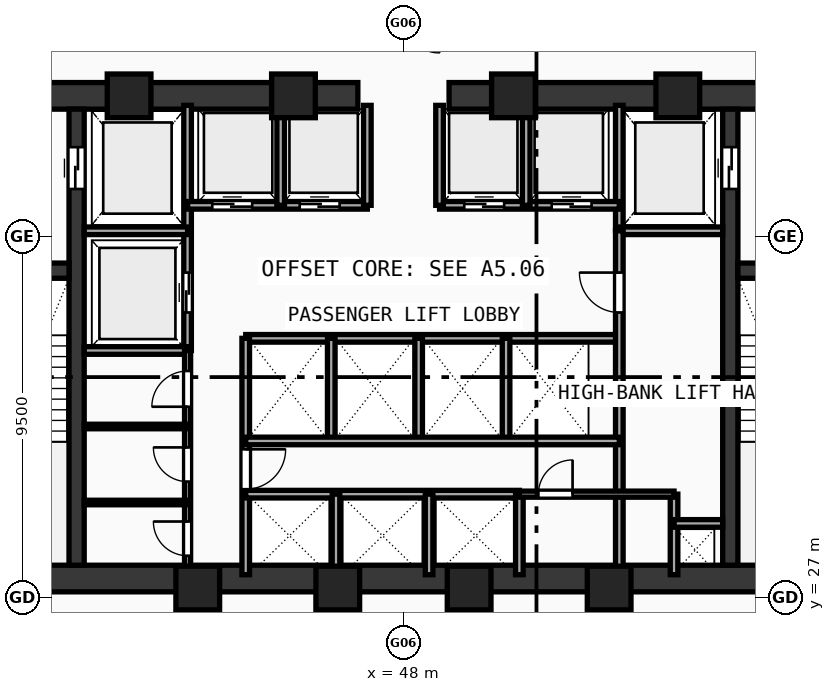
"""IFC4 building model, lengths in metres.
Left out: names, types, materials, properties, quantities, classifications, styles, units other than length and angle.
Written with IfcOpenShell. Run it as: python <this file> out.ifc"""

import sys

from ifc_helpers import new_model, si_unit, direction, frame, frame_2d, origin, origin_with_axes, origin_2d, place, context, subcontext, project, spatial, rectangle, hollow_rectangle, extrude, source, transform, mapped, element, fill, save


model = new_model("IFC4")
c1 = context("Model", 3, precision=1e-05, world=origin(), true_north=direction((0.0, 1.0)))
c2 = subcontext(c1, "Body", "Model", "MODEL_VIEW")
j1 = project(units=[si_unit("LENGTHUNIT", "METRE"), si_unit("PLANEANGLEUNIT", "RADIAN")], contexts=[c1])
p1 = place(None, origin())
s1 = spatial("IfcSite", under=j1, at=p1, CompositionType="ELEMENT")
p2 = place(p1, origin())
s2 = spatial("IfcBuilding", under=s1, at=p2, CompositionType="ELEMENT")
p3 = place(p2, frame((0.0, 0.0, 59.44)))
s3 = spatial("IfcBuildingStorey", under=s2, at=p3, CompositionType="ELEMENT", Elevation=59.44)
p4 = place(p3, frame((35.45, 27.5, 0.0), z_axis=(0.0, 0.0, 1.0), x_axis=(1.0, 0.0, 0.0)))
e1 = element("IfcWall", 1, at=p4, inside=s3, PredefinedType="SHEAR", context=c2, shape_type="SweptSolid", body=[
    extrude(rectangle(XDim=25.1, YDim=0.7, at=frame_2d((12.55, 0.0))), origin(), (0.0, 0.0, 1.0), 3.37),
])
p5 = place(p3, frame((35.45, 40.2, 0.0), z_axis=(0.0, 0.0, 1.0), x_axis=(1.0, 0.0, 0.0)))
e2 = element("IfcWall", 2, at=p5, inside=s3, PredefinedType="SHEAR", context=c2, shape_type="SweptSolid", body=[
    extrude(rectangle(XDim=11.35, YDim=0.7, at=frame_2d((5.675, 0.0))), origin(), (0.0, 0.0, 1.0), 3.37),
])
p6 = place(p5, frame((1.7, 0.0, 0.0)))
e3 = element("IfcOpeningElement", 3, at=p6, cuts=e2, PredefinedType="OPENING", context=c2, shape_type="SweptSolid", body=[
    extrude(rectangle(XDim=1.05, YDim=2.1, at=frame_2d((0.525, 1.05))), frame((0.0, 0.36, 0.0), z_axis=(0.0, -1.0, 0.0), x_axis=(1.0, 0.0, 0.0)), (0.0, 0.0, 1.0), 0.72),
])
p7 = place(p3, frame((49.2, 40.2, 0.0), z_axis=(0.0, 0.0, 1.0), x_axis=(1.0, 0.0, 0.0)))
e4 = element("IfcWall", 4, at=p7, inside=s3, PredefinedType="SHEAR", context=c2, shape_type="SweptSolid", body=[
    extrude(rectangle(XDim=11.35, YDim=0.7, at=frame_2d((5.675, 0.0))), origin(), (0.0, 0.0, 1.0), 3.37),
])
p8 = place(p7, frame((8.6, 0.0, 0.0)))
e5 = element("IfcOpeningElement", 5, at=p8, cuts=e4, PredefinedType="OPENING", context=c2, shape_type="SweptSolid", body=[
    extrude(rectangle(XDim=1.05, YDim=2.1, at=frame_2d((0.525, 1.05))), frame((0.0, 0.36, 0.0), z_axis=(0.0, -1.0, 0.0), x_axis=(1.0, 0.0, 0.0)), (0.0, 0.0, 1.0), 0.72),
])
p9 = place(p3, frame((39.4, 27.85, 0.0), z_axis=(0.0, 0.0, 1.0), x_axis=(0.0, 1.0, 0.0)))
e6 = element("IfcWall", 6, at=p9, inside=s3, PredefinedType="SHEAR", context=c2, shape_type="SweptSolid", body=[
    extrude(rectangle(XDim=12.0, YDim=0.4, at=frame_2d((6.0, 0.0))), origin(), (0.0, 0.0, 1.0), 3.37),
])
p10 = place(p9, frame((9.9, 0.0, 0.0)))
e7 = element("IfcOpeningElement", 7, at=p10, cuts=e6, PredefinedType="OPENING", context=c2, shape_type="SweptSolid", body=[
    extrude(rectangle(XDim=1.1, YDim=2.1, at=frame_2d((0.55, 1.05))), frame((0.0, 0.21, 0.0), z_axis=(0.0, -1.0, 0.0), x_axis=(1.0, 0.0, 0.0)), (0.0, 0.0, 1.0), 0.42),
])
p11 = place(p3, frame((56.6, 27.85, 0.0), z_axis=(0.0, 0.0, 1.0), x_axis=(0.0, 1.0, 0.0)))
e8 = element("IfcWall", 8, at=p11, inside=s3, PredefinedType="SHEAR", context=c2, shape_type="SweptSolid", body=[
    extrude(rectangle(XDim=12.0, YDim=0.4, at=frame_2d((6.0, 0.0))), origin(), (0.0, 0.0, 1.0), 3.37),
])
p12 = place(p11, frame((9.9, 0.0, 0.0)))
e9 = element("IfcOpeningElement", 9, at=p12, cuts=e8, PredefinedType="OPENING", context=c2, shape_type="SweptSolid", body=[
    extrude(rectangle(XDim=1.1, YDim=2.1, at=frame_2d((0.55, 1.05))), frame((0.0, 0.21, 0.0), z_axis=(0.0, -1.0, 0.0), x_axis=(1.0, 0.0, 0.0)), (0.0, 0.0, 1.0), 0.42),
])
p13 = place(p3, frame((36.15, 35.6, 0.0), z_axis=(0.0, 0.0, 1.0), x_axis=(1.0, 0.0, 0.0)))
e10 = element("IfcWall", 10, at=p13, inside=s3, PredefinedType="SHEAR", context=c2, shape_type="SweptSolid", body=[
    extrude(rectangle(XDim=3.05, YDim=0.4, at=frame_2d((1.525, 0.0))), origin(), (0.0, 0.0, 1.0), 3.37),
])
p14 = place(p13, frame((0.97, 0.0, 0.0)))
e11 = element("IfcOpeningElement", 11, at=p14, cuts=e10, PredefinedType="OPENING", context=c2, shape_type="SweptSolid", body=[
    extrude(rectangle(XDim=1.05, YDim=2.1, at=frame_2d((0.525, 1.05))), frame((0.0, 0.21, 0.0), z_axis=(0.0, -1.0, 0.0), x_axis=(1.0, 0.0, 0.0)), (0.0, 0.0, 1.0), 0.42),
])
p15 = place(p3, frame((56.8, 35.6, 0.0), z_axis=(0.0, 0.0, 1.0), x_axis=(1.0, 0.0, 0.0)))
e12 = element("IfcWall", 12, at=p15, inside=s3, PredefinedType="SHEAR", context=c2, shape_type="SweptSolid", body=[
    extrude(rectangle(XDim=3.05, YDim=0.4, at=frame_2d((1.525, 0.0))), origin(), (0.0, 0.0, 1.0), 3.37),
])
p16 = place(p15, frame((1.02, 0.0, 0.0)))
e13 = element("IfcOpeningElement", 13, at=p16, cuts=e12, PredefinedType="OPENING", context=c2, shape_type="SweptSolid", body=[
    extrude(rectangle(XDim=1.05, YDim=2.1, at=frame_2d((0.525, 1.05))), frame((0.0, 0.21, 0.0), z_axis=(0.0, -1.0, 0.0), x_axis=(1.0, 0.0, 0.0)), (0.0, 0.0, 1.0), 0.42),
])
m1 = source(origin(), c2, "Body", "SweptSolid", [
    extrude(hollow_rectangle(XDim=1.15, YDim=1.15, WallThickness=0.048, at=origin_2d()), origin(), (0.0, 0.0, 1.0), 3.63),
])
for number, where, z_axis, x_axis in (
    (14, (42.588, 27.25, -0.26), (0.0, 0.0, 1.0), (1.0, 0.0, 0.0)),
    (15, (46.272, 27.25, -0.26), (0.0, 0.0, 1.0), (1.0, 0.0, 0.0)),
    (16, (49.729, 27.25, -0.26), (0.0, 0.0, 1.0), (1.0, 0.0, 0.0)),
    (17, (53.412, 27.25, -0.26), (0.0, 0.0, 1.0), (1.0, 0.0, 0.0)),
    (18, (55.219, 40.2, -0.26), (0.0, 0.0, 1.0), (1.0, 0.0, 0.0)),
    (19, (50.894, 40.2, -0.26), (0.0, 0.0, 1.0), (1.0, 0.0, 0.0)),
    (20, (45.106, 40.2, -0.26), (0.0, 0.0, 1.0), (1.0, 0.0, 0.0)),
    (21, (40.781, 40.2, -0.26), (0.0, 0.0, 1.0), (1.0, 0.0, 0.0)),
):
    element("IfcColumn", number, at=place(p3, frame(where, z_axis=z_axis, x_axis=x_axis)), inside=s3, PredefinedType="COLUMN", context=c2, shape_type="MappedRepresentation", body=[
        mapped(m1, transform((0.0, 0.0, 0.0), scale=1.0)),
    ])
p17 = place(p3, frame((42.32, 33.5, 0.0), z_axis=(0.0, 0.0, 1.0), x_axis=(0.0, 1.0, 0.0)))
e22 = element("IfcWall", 22, at=p17, inside=s3, PredefinedType="SOLIDWALL", context=c2, shape_type="SweptSolid", body=[
    extrude(rectangle(XDim=6.45, YDim=0.2, at=frame_2d((3.225, 0.0))), origin(), (0.0, 0.0, 1.0), 3.37),
])
p18 = place(p17, frame((1.0, 0.0, 0.0)))
e23 = element("IfcOpeningElement", 23, at=p18, cuts=e22, PredefinedType="OPENING", context=c2, shape_type="SweptSolid", body=[
    extrude(rectangle(XDim=1.05, YDim=2.1, at=frame_2d((0.525, 1.05))), frame((0.0, 0.11, 0.0), z_axis=(0.0, -1.0, 0.0), x_axis=(1.0, 0.0, 0.0)), (0.0, 0.0, 1.0), 0.22),
])
for number, where, z_axis, x_axis in (
    (24, (39.6, 36.65, 0.0), (0.0, 0.0, 1.0), (1.0, 0.0, 0.0)),
    (25, (39.6, 33.5, 0.0), (0.0, 0.0, 1.0), (1.0, 0.0, 0.0)),
):
    element("IfcWall", number, at=place(p3, frame(where, z_axis=z_axis, x_axis=x_axis)), inside=s3, PredefinedType="SOLIDWALL", context=c2, shape_type="SweptSolid", body=[
        extrude(rectangle(XDim=2.72, YDim=0.2, at=frame_2d((1.36, 0.0))), origin(), (0.0, 0.0, 1.0), 3.37),
    ])
p19 = place(p3, frame((53.68, 36.65, 0.0), z_axis=(0.0, 0.0, 1.0), x_axis=(0.0, 1.0, 0.0)))
e26 = element("IfcWall", 26, at=p19, inside=s3, PredefinedType="SOLIDWALL", context=c2, shape_type="SweptSolid", body=[
    extrude(rectangle(XDim=3.3, YDim=0.2, at=frame_2d((1.65, 0.0))), origin(), (0.0, 0.0, 1.0), 3.37),
])
p20 = place(p3, frame((53.68, 36.65, 0.0), z_axis=(0.0, 0.0, 1.0), x_axis=(1.0, 0.0, 0.0)))
e27 = element("IfcWall", 27, at=p20, inside=s3, PredefinedType="SOLIDWALL", context=c2, shape_type="SweptSolid", body=[
    extrude(rectangle(XDim=2.72, YDim=0.2, at=frame_2d((1.36, 0.0))), origin(), (0.0, 0.0, 1.0), 3.37),
])
p21 = place(p3, frame((42.32, 37.32, 0.0), z_axis=(0.0, 0.0, 1.0), x_axis=(1.0, 0.0, 0.0)))
e28 = element("IfcWall", 28, at=p21, inside=s3, PredefinedType="SOLIDWALL", context=c2, shape_type="SweptSolid", body=[
    extrude(rectangle(XDim=4.73, YDim=0.2, at=frame_2d((2.365, 0.0))), origin(), (0.0, 0.0, 1.0), 3.37),
])
p22 = place(p21, frame((0.65, 0.0, 0.0)))
e29 = element("IfcOpeningElement", 29, at=p22, cuts=e28, PredefinedType="OPENING", context=c2, shape_type="SweptSolid", body=[
    extrude(rectangle(XDim=1.05, YDim=2.1, at=frame_2d((0.525, 1.05))), frame((0.0, 0.11, 0.0), z_axis=(0.0, -1.0, 0.0), x_axis=(1.0, 0.0, 0.0)), (0.0, 0.0, 1.0), 0.22),
])
p23 = place(p21, frame((2.95, 0.0, 0.0)))
e30 = element("IfcOpeningElement", 30, at=p23, cuts=e28, PredefinedType="OPENING", context=c2, shape_type="SweptSolid", body=[
    extrude(rectangle(XDim=1.05, YDim=2.1, at=frame_2d((0.525, 1.05))), frame((0.0, 0.11, 0.0), z_axis=(0.0, -1.0, 0.0), x_axis=(1.0, 0.0, 0.0)), (0.0, 0.0, 1.0), 0.22),
])
p24 = place(p3, frame((48.95, 37.32, 0.0), z_axis=(0.0, 0.0, 1.0), x_axis=(1.0, 0.0, 0.0)))
e31 = element("IfcWall", 31, at=p24, inside=s3, PredefinedType="SOLIDWALL", context=c2, shape_type="SweptSolid", body=[
    extrude(rectangle(XDim=4.73, YDim=0.2, at=frame_2d((2.365, 0.0))), origin(), (0.0, 0.0, 1.0), 3.37),
])
p25 = place(p24, frame((0.65, 0.0, 0.0)))
e32 = element("IfcOpeningElement", 32, at=p25, cuts=e31, PredefinedType="OPENING", context=c2, shape_type="SweptSolid", body=[
    extrude(rectangle(XDim=1.05, YDim=2.1, at=frame_2d((0.525, 1.05))), frame((0.0, 0.11, 0.0), z_axis=(0.0, -1.0, 0.0), x_axis=(1.0, 0.0, 0.0)), (0.0, 0.0, 1.0), 0.22),
])
p26 = place(p24, frame((2.95, 0.0, 0.0)))
e33 = element("IfcOpeningElement", 33, at=p26, cuts=e31, PredefinedType="OPENING", context=c2, shape_type="SweptSolid", body=[
    extrude(rectangle(XDim=1.05, YDim=2.1, at=frame_2d((0.525, 1.05))), frame((0.0, 0.11, 0.0), z_axis=(0.0, -1.0, 0.0), x_axis=(1.0, 0.0, 0.0)), (0.0, 0.0, 1.0), 0.22),
])
for number, where, z_axis, x_axis in (
    (34, (47.05, 37.32, 0.0), (0.0, 0.0, 1.0), (0.0, 1.0, 0.0)),
    (35, (48.95, 37.32, 0.0), (0.0, 0.0, 1.0), (0.0, 1.0, 0.0)),
    (36, (44.77, 37.32, 0.0), (0.0, 0.0, 1.0), (0.0, 1.0, 0.0)),
    (37, (51.23, 37.32, 0.0), (0.0, 0.0, 1.0), (0.0, 1.0, 0.0)),
):
    element("IfcWall", number, at=place(p3, frame(where, z_axis=z_axis, x_axis=x_axis)), inside=s3, PredefinedType="SOLIDWALL", context=c2, shape_type="SweptSolid", body=[
        extrude(rectangle(XDim=2.63, YDim=0.2, at=frame_2d((1.315, 0.0))), origin(), (0.0, 0.0, 1.0), 3.37),
    ])
p27 = place(p3, frame((43.85, 33.82, 0.0), z_axis=(0.0, 0.0, 1.0), x_axis=(1.0, 0.0, 0.0)))
e38 = element("IfcWall", 38, at=p27, inside=s3, PredefinedType="SOLIDWALL", context=c2, shape_type="SweptSolid", body=[
    extrude(rectangle(XDim=9.83, YDim=0.2, at=frame_2d((4.915, 0.0))), origin(), (0.0, 0.0, 1.0), 3.37),
])
p28 = place(p3, frame((43.85, 27.6, 0.0), z_axis=(0.0, 0.0, 1.0), x_axis=(0.0, 1.0, 0.0)))
e39 = element("IfcWall", 39, at=p28, inside=s3, PredefinedType="SOLIDWALL", context=c2, shape_type="SweptSolid", body=[
    extrude(rectangle(XDim=6.22, YDim=0.2, at=frame_2d((3.11, 0.0))), origin(), (0.0, 0.0, 1.0), 3.37),
])
p29 = place(p28, frame((2.25, 0.0, 0.0)))
e40 = element("IfcOpeningElement", 40, at=p29, cuts=e39, PredefinedType="OPENING", context=c2, shape_type="SweptSolid", body=[
    extrude(rectangle(XDim=1.05, YDim=2.1, at=frame_2d((0.525, 1.05))), frame((0.0, 0.11, 0.0), z_axis=(0.0, -1.0, 0.0), x_axis=(1.0, 0.0, 0.0)), (0.0, 0.0, 1.0), 0.22),
])
p30 = place(p3, frame((53.68, 27.6, 0.0), z_axis=(0.0, 0.0, 1.0), x_axis=(0.0, 1.0, 0.0)))
e41 = element("IfcWall", 41, at=p30, inside=s3, PredefinedType="SOLIDWALL", context=c2, shape_type="SweptSolid", body=[
    extrude(rectangle(XDim=9.05, YDim=0.2, at=frame_2d((4.525, 0.0))), origin(), (0.0, 0.0, 1.0), 3.37),
])
p31 = place(p30, frame((6.9, 0.0, 0.0)))
e42 = element("IfcOpeningElement", 42, at=p31, cuts=e41, PredefinedType="OPENING", context=c2, shape_type="SweptSolid", body=[
    extrude(rectangle(XDim=1.05, YDim=2.1, at=frame_2d((0.525, 1.05))), frame((0.0, 0.11, 0.0), z_axis=(0.0, -1.0, 0.0), x_axis=(1.0, 0.0, 0.0)), (0.0, 0.0, 1.0), 0.22),
])
for number, where, z_axis, x_axis in (
    (43, (46.1, 31.12, 0.0), (0.0, 0.0, 1.0), (0.0, 1.0, 0.0)),
    (44, (48.4, 31.12, 0.0), (0.0, 0.0, 1.0), (0.0, 1.0, 0.0)),
    (45, (50.7, 31.12, 0.0), (0.0, 0.0, 1.0), (0.0, 1.0, 0.0)),
):
    element("IfcWall", number, at=place(p3, frame(where, z_axis=z_axis, x_axis=x_axis)), inside=s3, PredefinedType="SOLIDWALL", context=c2, shape_type="SweptSolid", body=[
        extrude(rectangle(XDim=2.7, YDim=0.2, at=frame_2d((1.35, 0.0))), origin(), (0.0, 0.0, 1.0), 3.37),
    ])
p32 = place(p3, frame((43.85, 29.72, 0.0), z_axis=(0.0, 0.0, 1.0), x_axis=(1.0, 0.0, 0.0)))
e46 = element("IfcWall", 46, at=p32, inside=s3, PredefinedType="SOLIDWALL", context=c2, shape_type="SweptSolid", body=[
    extrude(rectangle(XDim=7.2, YDim=0.2, at=frame_2d((3.6, 0.0))), origin(), (0.0, 0.0, 1.0), 3.37),
])
p33 = place(p3, frame((51.05, 27.6, 0.0), z_axis=(0.0, 0.0, 1.0), x_axis=(0.0, 1.0, 0.0)))
e47 = element("IfcWall", 47, at=p33, inside=s3, PredefinedType="SOLIDWALL", context=c2, shape_type="SweptSolid", body=[
    extrude(rectangle(XDim=2.12, YDim=0.2, at=frame_2d((1.06, 0.0))), origin(), (0.0, 0.0, 1.0), 3.37),
])
p34 = place(p3, frame((43.85, 31.12, 0.0), z_axis=(0.0, 0.0, 1.0), x_axis=(1.0, 0.0, 0.0)))
e48 = element("IfcWall", 48, at=p34, inside=s3, PredefinedType="SOLIDWALL", context=c2, shape_type="SweptSolid", body=[
    extrude(rectangle(XDim=9.83, YDim=0.2, at=frame_2d((4.915, 0.0))), origin(), (0.0, 0.0, 1.0), 3.37),
])
for number, where, z_axis, x_axis in (
    (49, (46.225, 27.6, 0.0), (0.0, 0.0, 1.0), (0.0, 1.0, 0.0)),
    (50, (48.675, 27.6, 0.0), (0.0, 0.0, 1.0), (0.0, 1.0, 0.0)),
    (51, (55.12, 27.6, 0.0), (0.0, 0.0, 1.0), (0.0, 1.0, 0.0)),
):
    element("IfcWall", number, at=place(p3, frame(where, z_axis=z_axis, x_axis=x_axis)), inside=s3, PredefinedType="SOLIDWALL", context=c2, shape_type="SweptSolid", body=[
        extrude(rectangle(XDim=2.12, YDim=0.2, at=frame_2d((1.06, 0.0))), origin(), (0.0, 0.0, 1.0), 3.37),
    ])
p35 = place(p3, frame((55.12, 28.95, 0.0), z_axis=(0.0, 0.0, 1.0), x_axis=(1.0, 0.0, 0.0)))
e52 = element("IfcWall", 52, at=p35, inside=s3, PredefinedType="SOLIDWALL", context=c2, shape_type="SweptSolid", body=[
    extrude(rectangle(XDim=1.28, YDim=0.2, at=frame_2d((0.64, 0.0))), origin(), (0.0, 0.0, 1.0), 3.37),
])
p36 = place(p3, frame((42.32, 27.6, 0.0), z_axis=(0.0, 0.0, 1.0), x_axis=(0.0, 1.0, 0.0)))
e53 = element("IfcWall", 53, at=p36, inside=s3, PredefinedType="PARTITIONING", context=c2, shape_type="SweptSolid", body=[
    extrude(rectangle(XDim=5.9, YDim=0.16, at=frame_2d((2.95, 0.0))), origin(), (0.0, 0.0, 1.0), 3.37),
])
p37 = place(p36, frame((0.5, 0.0, 0.0)))
e54 = element("IfcOpeningElement", 54, at=p37, cuts=e53, PredefinedType="OPENING", context=c2, shape_type="SweptSolid", body=[
    extrude(rectangle(XDim=0.9, YDim=2.1, at=frame_2d((0.45, 1.05))), frame((0.0, 0.09, 0.0), z_axis=(0.0, -1.0, 0.0), x_axis=(1.0, 0.0, 0.0)), (0.0, 0.0, 1.0), 0.18),
])
p38 = place(p36, frame((2.45, 0.0, 0.0)))
e55 = element("IfcOpeningElement", 55, at=p38, cuts=e53, PredefinedType="OPENING", context=c2, shape_type="SweptSolid", body=[
    extrude(rectangle(XDim=0.9, YDim=2.1, at=frame_2d((0.45, 1.05))), frame((0.0, 0.09, 0.0), z_axis=(0.0, -1.0, 0.0), x_axis=(1.0, 0.0, 0.0)), (0.0, 0.0, 1.0), 0.18),
])
p39 = place(p36, frame((4.42, 0.0, 0.0)))
e56 = element("IfcOpeningElement", 56, at=p39, cuts=e53, PredefinedType="OPENING", context=c2, shape_type="SweptSolid", body=[
    extrude(rectangle(XDim=0.94, YDim=2.1, at=frame_2d((0.47, 1.05))), frame((0.0, 0.09, 0.0), z_axis=(0.0, -1.0, 0.0), x_axis=(1.0, 0.0, 0.0)), (0.0, 0.0, 1.0), 0.18),
])
p40 = place(p3, frame((51.05, 29.72, 0.0), z_axis=(0.0, 0.0, 1.0), x_axis=(1.0, 0.0, 0.0)))
e57 = element("IfcWall", 57, at=p40, inside=s3, PredefinedType="PARTITIONING", context=c2, shape_type="SweptSolid", body=[
    extrude(rectangle(XDim=4.07, YDim=0.16, at=frame_2d((2.035, 0.0))), origin(), (0.0, 0.0, 1.0), 3.37),
])
p41 = place(p40, frame((0.5, 0.0, 0.0)))
e58 = element("IfcOpeningElement", 58, at=p41, cuts=e57, PredefinedType="OPENING", context=c2, shape_type="SweptSolid", body=[
    extrude(rectangle(XDim=0.9, YDim=2.1, at=frame_2d((0.45, 1.05))), frame((0.0, 0.09, 0.0), z_axis=(0.0, -1.0, 0.0), x_axis=(1.0, 0.0, 0.0)), (0.0, 0.0, 1.0), 0.18),
])
for number, where, z_axis, x_axis in (
    (59, (39.6, 29.5, 0.0), (0.0, 0.0, 1.0), (1.0, 0.0, 0.0)),
    (60, (39.6, 31.5, 0.0), (0.0, 0.0, 1.0), (1.0, 0.0, 0.0)),
):
    element("IfcWall", number, at=place(p3, frame(where, z_axis=z_axis, x_axis=x_axis)), inside=s3, PredefinedType="PARTITIONING", context=c2, shape_type="SweptSolid", body=[
        extrude(rectangle(XDim=2.72, YDim=0.12, at=frame_2d((1.36, 0.0))), origin(), (0.0, 0.0, 1.0), 3.37),
    ])
m2 = source(origin(), c2, "Body", "SweptSolid", [
    extrude(rectangle(XDim=1.1, YDim=2.1, at=frame_2d((0.55, 1.05))), frame((0.0, 0.025, 0.0), z_axis=(0.0, -1.0, 0.0), x_axis=(1.0, 0.0, 0.0)), (0.0, 0.0, 1.0), 0.05),
])
p42 = place(p10, frame((1.1, 0.0, 0.0), z_axis=(0.0, 0.0, 1.0), x_axis=(-1.0, 0.0, 0.0)))
e61 = element("IfcDoor", 61, at=p42, inside=s3, OperationType="DOUBLE_DOOR_SLIDING", PredefinedType="DOOR", context=c2, shape_type="MappedRepresentation", body=[
    mapped(m2, transform((0.0, 0.0, 0.0), scale=1.0)),
])
fill(e7, e61)
p43 = place(p12, origin_with_axes())
e62 = element("IfcDoor", 62, at=p43, inside=s3, OperationType="DOUBLE_DOOR_SLIDING", PredefinedType="DOOR", context=c2, shape_type="MappedRepresentation", body=[
    mapped(m2, transform((0.0, 0.0, 0.0), scale=1.0)),
])
fill(e9, e62)
m3 = source(origin(), c2, "Body", "SweptSolid", [
    extrude(rectangle(XDim=1.05, YDim=2.1, at=frame_2d((0.525, 1.05))), frame((0.0, 0.025, 0.0), z_axis=(0.0, -1.0, 0.0), x_axis=(1.0, 0.0, 0.0)), (0.0, 0.0, 1.0), 0.05),
])
p44 = place(p18, origin_with_axes())
e63 = element("IfcDoor", 63, at=p44, inside=s3, OperationType="DOUBLE_DOOR_SLIDING", PredefinedType="DOOR", context=c2, shape_type="MappedRepresentation", body=[
    mapped(m3, transform((0.0, 0.0, 0.0), scale=1.0)),
])
fill(e23, e63)
p45 = place(p22, frame((1.05, 0.0, 0.0), z_axis=(0.0, 0.0, 1.0), x_axis=(-1.0, 0.0, 0.0)))
e64 = element("IfcDoor", 64, at=p45, inside=s3, OperationType="DOUBLE_DOOR_SLIDING", PredefinedType="DOOR", context=c2, shape_type="MappedRepresentation", body=[
    mapped(m3, transform((0.0, 0.0, 0.0), scale=1.0)),
])
fill(e29, e64)
p46 = place(p23, frame((1.05, 0.0, 0.0), z_axis=(0.0, 0.0, 1.0), x_axis=(-1.0, 0.0, 0.0)))
e65 = element("IfcDoor", 65, at=p46, inside=s3, OperationType="DOUBLE_DOOR_SLIDING", PredefinedType="DOOR", context=c2, shape_type="MappedRepresentation", body=[
    mapped(m3, transform((0.0, 0.0, 0.0), scale=1.0)),
])
fill(e30, e65)
p47 = place(p25, frame((1.05, 0.0, 0.0), z_axis=(0.0, 0.0, 1.0), x_axis=(-1.0, 0.0, 0.0)))
e66 = element("IfcDoor", 66, at=p47, inside=s3, OperationType="DOUBLE_DOOR_SLIDING", PredefinedType="DOOR", context=c2, shape_type="MappedRepresentation", body=[
    mapped(m3, transform((0.0, 0.0, 0.0), scale=1.0)),
])
fill(e32, e66)
p48 = place(p26, frame((1.05, 0.0, 0.0), z_axis=(0.0, 0.0, 1.0), x_axis=(-1.0, 0.0, 0.0)))
e67 = element("IfcDoor", 67, at=p48, inside=s3, OperationType="DOUBLE_DOOR_SLIDING", PredefinedType="DOOR", context=c2, shape_type="MappedRepresentation", body=[
    mapped(m3, transform((0.0, 0.0, 0.0), scale=1.0)),
])
fill(e33, e67)
p49 = place(p29, frame((1.05, 0.0, 0.0), z_axis=(0.0, 0.0, 1.0), x_axis=(-1.0, 0.0, 0.0)))
e68 = element("IfcDoor", 68, at=p49, inside=s3, OperationType="SINGLE_SWING_LEFT", PredefinedType="DOOR", context=c2, shape_type="MappedRepresentation", body=[
    mapped(m3, transform((0.0, 0.0, 0.0), scale=1.0)),
])
fill(e40, e68)
p50 = place(p31, origin_with_axes())
e69 = element("IfcDoor", 69, at=p50, inside=s3, OperationType="SINGLE_SWING_RIGHT", PredefinedType="DOOR", context=c2, shape_type="MappedRepresentation", body=[
    mapped(m3, transform((0.0, 0.0, 0.0), scale=1.0)),
])
fill(e42, e69)
m4 = source(origin(), c2, "Body", "SweptSolid", [
    extrude(rectangle(XDim=0.9, YDim=2.1, at=frame_2d((0.45, 1.05))), frame((0.0, 0.025, 0.0), z_axis=(0.0, -1.0, 0.0), x_axis=(1.0, 0.0, 0.0)), (0.0, 0.0, 1.0), 0.05),
])
p51 = place(p37, origin_with_axes())
e70 = element("IfcDoor", 70, at=p51, inside=s3, OperationType="SINGLE_SWING_RIGHT", PredefinedType="DOOR", context=c2, shape_type="MappedRepresentation", body=[
    mapped(m4, transform((0.0, 0.0, 0.0), scale=1.0)),
])
fill(e54, e70)
p52 = place(p38, origin_with_axes())
e71 = element("IfcDoor", 71, at=p52, inside=s3, OperationType="SINGLE_SWING_RIGHT", PredefinedType="DOOR", context=c2, shape_type="MappedRepresentation", body=[
    mapped(m4, transform((0.0, 0.0, 0.0), scale=1.0)),
])
fill(e55, e71)
m5 = source(origin(), c2, "Body", "SweptSolid", [
    extrude(rectangle(XDim=0.94, YDim=2.1, at=frame_2d((0.47, 1.05))), frame((0.0, 0.025, 0.0), z_axis=(0.0, -1.0, 0.0), x_axis=(1.0, 0.0, 0.0)), (0.0, 0.0, 1.0), 0.05),
])
p53 = place(p39, origin_with_axes())
e72 = element("IfcDoor", 72, at=p53, inside=s3, OperationType="SINGLE_SWING_LEFT", PredefinedType="DOOR", context=c2, shape_type="MappedRepresentation", body=[
    mapped(m5, transform((0.0, 0.0, 0.0), scale=1.0)),
])
fill(e56, e72)
p54 = place(p41, origin_with_axes())
e73 = element("IfcDoor", 73, at=p54, inside=s3, OperationType="SINGLE_SWING_RIGHT", PredefinedType="DOOR", context=c2, shape_type="MappedRepresentation", body=[
    mapped(m4, transform((0.0, 0.0, 0.0), scale=1.0)),
])
fill(e58, e73)
save(model, sys.argv[1])
